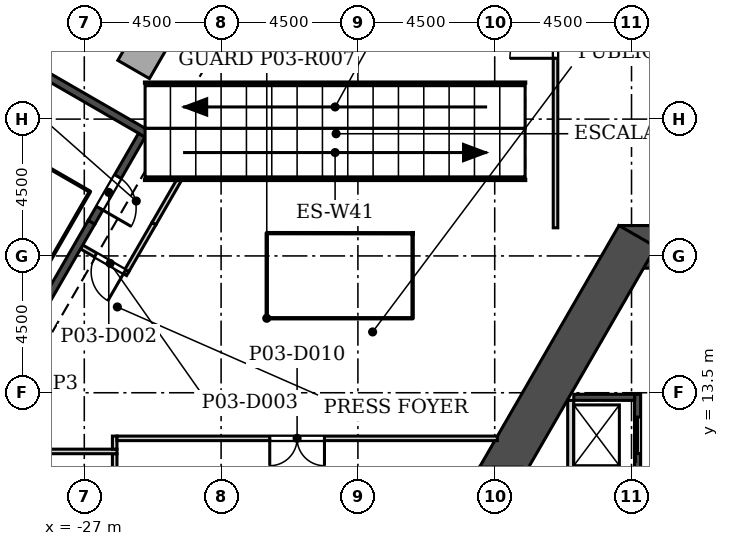
"""IFC4 building model, lengths in metres.
Left out: names, types, materials, properties, quantities, classifications, styles, units other than length and angle.
Written with IfcOpenShell. Run it as: python <this file> out.ifc"""

import sys

from ifc_helpers import new_model, si_unit, direction, frame, frame_2d, origin, place, context, subcontext, project, spatial, polyline, rectangle, outline, extrude, element, fill, save


model = new_model("IFC4")
c1 = context("Model", 3, precision=1e-05, world=origin(), true_north=direction((0.0, 1.0)))
c2 = subcontext(c1, "Body", "Model", "MODEL_VIEW")
j1 = project(units=[si_unit("LENGTHUNIT", "METRE"), si_unit("PLANEANGLEUNIT", "RADIAN")], contexts=[c1])
p1 = place(None, origin())
s1 = spatial("IfcSite", under=j1, at=p1, CompositionType="ELEMENT")
p2 = place(p1, origin())
s2 = spatial("IfcBuilding", under=s1, at=p2, CompositionType="ELEMENT")
p3 = place(p2, frame((0.0, 0.0, 20.0)))
s3 = spatial("IfcBuildingStorey", under=s2, at=p3, CompositionType="ELEMENT", Elevation=20.0)
p4 = place(p3, frame((9.412, 18.3, 0.0), z_axis=(0.0, 0.0, 1.0), x_axis=(-1.0, 0.0, 0.0)))
e1 = element("IfcWall", 1, at=p4, inside=s3, PredefinedType="SHEAR", context=c2, shape_type="SweptSolid", body=[
    extrude(rectangle(XDim=18.823, YDim=1.4, at=frame_2d((9.412, 0.0))), origin(), (0.0, 0.0, 1.0), 5.0),
])
p5 = place(p4, frame((8.711, 0.0, 0.0)))
e2 = element("IfcOpeningElement", 2, at=p5, cuts=e1, PredefinedType="OPENING", context=c2, shape_type="SweptSolid", body=[
    extrude(rectangle(XDim=1.4, YDim=2.1, at=frame_2d((0.7, 1.05))), frame((0.0, 0.71, 0.0), z_axis=(0.0, -1.0, 0.0), x_axis=(1.0, 0.0, 0.0)), (0.0, 0.0, 1.0), 1.42),
])
p6 = place(p4, frame((11.412, 0.0, 0.0)))
e3 = element("IfcOpeningElement", 3, at=p6, cuts=e1, PredefinedType="OPENING", context=c2, shape_type="SweptSolid", body=[
    extrude(rectangle(XDim=6.0, YDim=2.4, at=frame_2d((3.0, 1.2))), frame((0.0, 0.71, 0.0), z_axis=(0.0, -1.0, 0.0), x_axis=(1.0, 0.0, 0.0)), (0.0, 0.0, 1.0), 1.42),
])
p7 = place(p4, frame((1.412, 0.0, 0.0)))
e4 = element("IfcOpeningElement", 4, at=p7, cuts=e1, PredefinedType="OPENING", context=c2, shape_type="SweptSolid", body=[
    extrude(rectangle(XDim=6.0, YDim=2.4, at=frame_2d((3.0, 1.2))), frame((0.0, 0.71, 0.0), z_axis=(0.0, -1.0, 0.0), x_axis=(1.0, 0.0, 0.0)), (0.0, 0.0, 1.0), 1.42),
])
p8 = place(p3, frame((-8.805, 18.65, 0.0), z_axis=(0.0, 0.0, 1.0), x_axis=(-0.50000187635, -0.866024320471, 0.0)))
e5 = element("IfcWall", 5, at=p8, inside=s3, PredefinedType="SHEAR", context=c2, shape_type="SweptSolid", body=[
    extrude(rectangle(XDim=9.177, YDim=1.4, at=frame_2d((4.588, 0.0))), origin(), (0.0, 0.0, 1.0), 5.0),
])
p9 = place(p3, frame((-4.853, 74.393, 0.0), z_axis=(0.0, 0.0, 1.0), x_axis=(-0.49999894854, -0.866026010844, 0.0)))
e6 = element("IfcWall", 6, at=p9, inside=s3, PredefinedType="SOLIDWALL", context=c2, shape_type="SweptSolid", body=[
    extrude(rectangle(XDim=76.0, YDim=0.34, at=frame_2d((38.0, 0.0))), origin(), (0.0, 0.0, 1.0), 3.0),
])
p10 = place(p9, frame((1.058, 0.0, 0.9)))
e7 = element("IfcOpeningElement", 7, at=p10, cuts=e6, PredefinedType="OPENING", context=c2, shape_type="SweptSolid", body=[
    extrude(rectangle(XDim=1.885, YDim=1.9, at=frame_2d((0.942, 0.95))), frame((0.0, 0.18, 0.0), z_axis=(0.0, -1.0, 0.0), x_axis=(1.0, 0.0, 0.0)), (0.0, 0.0, 1.0), 0.36),
])
p11 = place(p9, frame((4.058, 0.0, 0.9)))
e8 = element("IfcOpeningElement", 8, at=p11, cuts=e6, PredefinedType="OPENING", context=c2, shape_type="SweptSolid", body=[
    extrude(rectangle(XDim=1.885, YDim=1.9, at=frame_2d((0.942, 0.95))), frame((0.0, 0.18, 0.0), z_axis=(0.0, -1.0, 0.0), x_axis=(1.0, 0.0, 0.0)), (0.0, 0.0, 1.0), 0.36),
])
p12 = place(p9, frame((7.058, 0.0, 0.9)))
e9 = element("IfcOpeningElement", 9, at=p12, cuts=e6, PredefinedType="OPENING", context=c2, shape_type="SweptSolid", body=[
    extrude(rectangle(XDim=1.885, YDim=1.9, at=frame_2d((0.942, 0.95))), frame((0.0, 0.18, 0.0), z_axis=(0.0, -1.0, 0.0), x_axis=(1.0, 0.0, 0.0)), (0.0, 0.0, 1.0), 0.36),
])
p13 = place(p9, frame((10.058, 0.0, 0.9)))
e10 = element("IfcOpeningElement", 10, at=p13, cuts=e6, PredefinedType="OPENING", context=c2, shape_type="SweptSolid", body=[
    extrude(rectangle(XDim=1.885, YDim=1.9, at=frame_2d((0.942, 0.95))), frame((0.0, 0.18, 0.0), z_axis=(0.0, -1.0, 0.0), x_axis=(1.0, 0.0, 0.0)), (0.0, 0.0, 1.0), 0.36),
])
p14 = place(p9, frame((13.058, 0.0, 0.9)))
e11 = element("IfcOpeningElement", 11, at=p14, cuts=e6, PredefinedType="OPENING", context=c2, shape_type="SweptSolid", body=[
    extrude(rectangle(XDim=1.885, YDim=1.9, at=frame_2d((0.942, 0.95))), frame((0.0, 0.18, 0.0), z_axis=(0.0, -1.0, 0.0), x_axis=(1.0, 0.0, 0.0)), (0.0, 0.0, 1.0), 0.36),
])
p15 = place(p9, frame((16.058, 0.0, 0.9)))
e12 = element("IfcOpeningElement", 12, at=p15, cuts=e6, PredefinedType="OPENING", context=c2, shape_type="SweptSolid", body=[
    extrude(rectangle(XDim=1.885, YDim=1.9, at=frame_2d((0.942, 0.95))), frame((0.0, 0.18, 0.0), z_axis=(0.0, -1.0, 0.0), x_axis=(1.0, 0.0, 0.0)), (0.0, 0.0, 1.0), 0.36),
])
p16 = place(p9, frame((19.058, 0.0, 0.9)))
e13 = element("IfcOpeningElement", 13, at=p16, cuts=e6, PredefinedType="OPENING", context=c2, shape_type="SweptSolid", body=[
    extrude(rectangle(XDim=1.885, YDim=1.9, at=frame_2d((0.942, 0.95))), frame((0.0, 0.18, 0.0), z_axis=(0.0, -1.0, 0.0), x_axis=(1.0, 0.0, 0.0)), (0.0, 0.0, 1.0), 0.36),
])
p17 = place(p9, frame((22.058, 0.0, 0.9)))
e14 = element("IfcOpeningElement", 14, at=p17, cuts=e6, PredefinedType="OPENING", context=c2, shape_type="SweptSolid", body=[
    extrude(rectangle(XDim=1.885, YDim=1.9, at=frame_2d((0.942, 0.95))), frame((0.0, 0.18, 0.0), z_axis=(0.0, -1.0, 0.0), x_axis=(1.0, 0.0, 0.0)), (0.0, 0.0, 1.0), 0.36),
])
p18 = place(p9, frame((25.058, 0.0, 0.9)))
e15 = element("IfcOpeningElement", 15, at=p18, cuts=e6, PredefinedType="OPENING", context=c2, shape_type="SweptSolid", body=[
    extrude(rectangle(XDim=1.885, YDim=1.9, at=frame_2d((0.942, 0.95))), frame((0.0, 0.18, 0.0), z_axis=(0.0, -1.0, 0.0), x_axis=(1.0, 0.0, 0.0)), (0.0, 0.0, 1.0), 0.36),
])
p19 = place(p9, frame((28.058, 0.0, 0.9)))
e16 = element("IfcOpeningElement", 16, at=p19, cuts=e6, PredefinedType="OPENING", context=c2, shape_type="SweptSolid", body=[
    extrude(rectangle(XDim=1.885, YDim=1.9, at=frame_2d((0.942, 0.95))), frame((0.0, 0.18, 0.0), z_axis=(0.0, -1.0, 0.0), x_axis=(1.0, 0.0, 0.0)), (0.0, 0.0, 1.0), 0.36),
])
p20 = place(p9, frame((31.058, 0.0, 0.9)))
e17 = element("IfcOpeningElement", 17, at=p20, cuts=e6, PredefinedType="OPENING", context=c2, shape_type="SweptSolid", body=[
    extrude(rectangle(XDim=1.885, YDim=1.9, at=frame_2d((0.942, 0.95))), frame((0.0, 0.18, 0.0), z_axis=(0.0, -1.0, 0.0), x_axis=(1.0, 0.0, 0.0)), (0.0, 0.0, 1.0), 0.36),
])
p21 = place(p9, frame((34.058, 0.0, 0.9)))
e18 = element("IfcOpeningElement", 18, at=p21, cuts=e6, PredefinedType="OPENING", context=c2, shape_type="SweptSolid", body=[
    extrude(rectangle(XDim=1.885, YDim=1.9, at=frame_2d((0.942, 0.95))), frame((0.0, 0.18, 0.0), z_axis=(0.0, -1.0, 0.0), x_axis=(1.0, 0.0, 0.0)), (0.0, 0.0, 1.0), 0.36),
])
p22 = place(p9, frame((37.058, 0.0, 0.9)))
e19 = element("IfcOpeningElement", 19, at=p22, cuts=e6, PredefinedType="OPENING", context=c2, shape_type="SweptSolid", body=[
    extrude(rectangle(XDim=1.885, YDim=1.9, at=frame_2d((0.942, 0.95))), frame((0.0, 0.18, 0.0), z_axis=(0.0, -1.0, 0.0), x_axis=(1.0, 0.0, 0.0)), (0.0, 0.0, 1.0), 0.36),
])
p23 = place(p9, frame((40.058, 0.0, 0.9)))
e20 = element("IfcOpeningElement", 20, at=p23, cuts=e6, PredefinedType="OPENING", context=c2, shape_type="SweptSolid", body=[
    extrude(rectangle(XDim=1.885, YDim=1.9, at=frame_2d((0.942, 0.95))), frame((0.0, 0.18, 0.0), z_axis=(0.0, -1.0, 0.0), x_axis=(1.0, 0.0, 0.0)), (0.0, 0.0, 1.0), 0.36),
])
p24 = place(p9, frame((43.058, 0.0, 0.9)))
e21 = element("IfcOpeningElement", 21, at=p24, cuts=e6, PredefinedType="OPENING", context=c2, shape_type="SweptSolid", body=[
    extrude(rectangle(XDim=1.885, YDim=1.9, at=frame_2d((0.942, 0.95))), frame((0.0, 0.18, 0.0), z_axis=(0.0, -1.0, 0.0), x_axis=(1.0, 0.0, 0.0)), (0.0, 0.0, 1.0), 0.36),
])
p25 = place(p9, frame((46.058, 0.0, 0.9)))
e22 = element("IfcOpeningElement", 22, at=p25, cuts=e6, PredefinedType="OPENING", context=c2, shape_type="SweptSolid", body=[
    extrude(rectangle(XDim=1.885, YDim=1.9, at=frame_2d((0.942, 0.95))), frame((0.0, 0.18, 0.0), z_axis=(0.0, -1.0, 0.0), x_axis=(1.0, 0.0, 0.0)), (0.0, 0.0, 1.0), 0.36),
])
p26 = place(p9, frame((49.058, 0.0, 0.9)))
e23 = element("IfcOpeningElement", 23, at=p26, cuts=e6, PredefinedType="OPENING", context=c2, shape_type="SweptSolid", body=[
    extrude(rectangle(XDim=1.885, YDim=1.9, at=frame_2d((0.942, 0.95))), frame((0.0, 0.18, 0.0), z_axis=(0.0, -1.0, 0.0), x_axis=(1.0, 0.0, 0.0)), (0.0, 0.0, 1.0), 0.36),
])
p27 = place(p9, frame((52.058, 0.0, 0.9)))
e24 = element("IfcOpeningElement", 24, at=p27, cuts=e6, PredefinedType="OPENING", context=c2, shape_type="SweptSolid", body=[
    extrude(rectangle(XDim=1.885, YDim=1.9, at=frame_2d((0.942, 0.95))), frame((0.0, 0.18, 0.0), z_axis=(0.0, -1.0, 0.0), x_axis=(1.0, 0.0, 0.0)), (0.0, 0.0, 1.0), 0.36),
])
p28 = place(p9, frame((55.058, 0.0, 0.9)))
e25 = element("IfcOpeningElement", 25, at=p28, cuts=e6, PredefinedType="OPENING", context=c2, shape_type="SweptSolid", body=[
    extrude(rectangle(XDim=1.885, YDim=1.9, at=frame_2d((0.942, 0.95))), frame((0.0, 0.18, 0.0), z_axis=(0.0, -1.0, 0.0), x_axis=(1.0, 0.0, 0.0)), (0.0, 0.0, 1.0), 0.36),
])
p29 = place(p9, frame((58.058, 0.0, 0.9)))
e26 = element("IfcOpeningElement", 26, at=p29, cuts=e6, PredefinedType="OPENING", context=c2, shape_type="SweptSolid", body=[
    extrude(rectangle(XDim=1.885, YDim=1.9, at=frame_2d((0.942, 0.95))), frame((0.0, 0.18, 0.0), z_axis=(0.0, -1.0, 0.0), x_axis=(1.0, 0.0, 0.0)), (0.0, 0.0, 1.0), 0.36),
])
p30 = place(p9, frame((61.058, 0.0, 0.9)))
e27 = element("IfcOpeningElement", 27, at=p30, cuts=e6, PredefinedType="OPENING", context=c2, shape_type="SweptSolid", body=[
    extrude(rectangle(XDim=1.885, YDim=1.9, at=frame_2d((0.942, 0.95))), frame((0.0, 0.18, 0.0), z_axis=(0.0, -1.0, 0.0), x_axis=(1.0, 0.0, 0.0)), (0.0, 0.0, 1.0), 0.36),
])
p31 = place(p9, frame((64.058, 0.0, 0.9)))
e28 = element("IfcOpeningElement", 28, at=p31, cuts=e6, PredefinedType="OPENING", context=c2, shape_type="SweptSolid", body=[
    extrude(rectangle(XDim=1.885, YDim=1.9, at=frame_2d((0.942, 0.95))), frame((0.0, 0.18, 0.0), z_axis=(0.0, -1.0, 0.0), x_axis=(1.0, 0.0, 0.0)), (0.0, 0.0, 1.0), 0.36),
])
p32 = place(p9, frame((67.058, 0.0, 0.9)))
e29 = element("IfcOpeningElement", 29, at=p32, cuts=e6, PredefinedType="OPENING", context=c2, shape_type="SweptSolid", body=[
    extrude(rectangle(XDim=1.885, YDim=1.9, at=frame_2d((0.942, 0.95))), frame((0.0, 0.18, 0.0), z_axis=(0.0, -1.0, 0.0), x_axis=(1.0, 0.0, 0.0)), (0.0, 0.0, 1.0), 0.36),
])
p33 = place(p9, frame((70.058, 0.0, 0.9)))
e30 = element("IfcOpeningElement", 30, at=p33, cuts=e6, PredefinedType="OPENING", context=c2, shape_type="SweptSolid", body=[
    extrude(rectangle(XDim=1.885, YDim=1.9, at=frame_2d((0.942, 0.95))), frame((0.0, 0.18, 0.0), z_axis=(0.0, -1.0, 0.0), x_axis=(1.0, 0.0, 0.0)), (0.0, 0.0, 1.0), 0.36),
])
p34 = place(p9, frame((73.058, 0.0, 0.9)))
e31 = element("IfcOpeningElement", 31, at=p34, cuts=e6, PredefinedType="OPENING", context=c2, shape_type="SweptSolid", body=[
    extrude(rectangle(XDim=1.885, YDim=1.9, at=frame_2d((0.942, 0.95))), frame((0.0, 0.18, 0.0), z_axis=(0.0, -1.0, 0.0), x_axis=(1.0, 0.0, 0.0)), (0.0, 0.0, 1.0), 0.36),
])
p35 = place(p3, frame((0.0, 0.0, 5.0)))
e32 = element("IfcWall", 32, at=p35, inside=s3, PredefinedType="USERDEFINED", context=c2, shape_type="SweptSolid", body=[
    extrude(outline(polyline([(-21.857, 29.029), (-22.896, 29.629), (-25.896, 24.433), (-24.857, 23.833), (-21.857, 29.029)])), origin(), (0.0, 0.0, 1.0), 1.1),
])
p36 = place(p3, frame((-11.0, 5.85, 0.0), z_axis=(0.0, 0.0, 1.0), x_axis=(0.0, 1.0, 0.0)))
e33 = element("IfcWall", 33, at=p36, inside=s3, PredefinedType="SOLIDWALL", context=c2, shape_type="SweptSolid", body=[
    extrude(rectangle(XDim=7.4, YDim=0.2, at=frame_2d((3.7, 0.0))), origin(), (0.0, 0.0, 1.0), 3.0),
])
p37 = place(p3, frame((-8.8, 8.25, -0.3), z_axis=(0.0, 0.0, 1.0), x_axis=(0.0, 1.0, 0.0)))
e34 = element("IfcWall", 34, at=p37, inside=s3, PredefinedType="SOLIDWALL", context=c2, shape_type="SweptSolid", body=[
    extrude(rectangle(XDim=5.2, YDim=0.2, at=frame_2d((2.6, 0.0))), origin(), (0.0, 0.0, 1.0), 3.3),
])
p38 = place(p37, frame((0.75, 0.0, 0.3)))
e35 = element("IfcOpeningElement", 35, at=p38, cuts=e34, PredefinedType="OPENING", context=c2, shape_type="SweptSolid", body=[
    extrude(rectangle(XDim=1.2, YDim=2.1, at=frame_2d((0.6, 1.05))), frame((0.0, 0.11, 0.0), z_axis=(0.0, -1.0, 0.0), x_axis=(1.0, 0.0, 0.0)), (0.0, 0.0, 1.0), 0.22),
])
p39 = place(p37, frame((3.25, 0.0, 0.3)))
e36 = element("IfcOpeningElement", 36, at=p39, cuts=e34, PredefinedType="OPENING", context=c2, shape_type="SweptSolid", body=[
    extrude(rectangle(XDim=1.2, YDim=2.1, at=frame_2d((0.6, 1.05))), frame((0.0, 0.11, 0.0), z_axis=(0.0, -1.0, 0.0), x_axis=(1.0, 0.0, 0.0)), (0.0, 0.0, 1.0), 0.22),
])
p40 = place(p3, frame((-10.9, 13.35, -0.3), z_axis=(0.0, 0.0, 1.0), x_axis=(1.0, 0.0, 0.0)))
e37 = element("IfcWall", 37, at=p40, inside=s3, PredefinedType="SOLIDWALL", context=c2, shape_type="SweptSolid", body=[
    extrude(rectangle(XDim=2.0, YDim=0.2, at=frame_2d((1.0, 0.0))), origin(), (0.0, 0.0, 1.0), 3.3),
])
p41 = place(p3, frame((-26.0, 11.495, 0.0), z_axis=(0.0, 0.0, 1.0), x_axis=(0.0, -1.0, 0.0)))
e38 = element("IfcWall", 38, at=p41, inside=s3, PredefinedType="PARTITIONING", context=c2, shape_type="SweptSolid", body=[
    extrude(rectangle(XDim=1.42, YDim=0.15, at=frame_2d((0.71, 0.0))), origin(), (0.0, 0.0, 1.0), 3.0),
])
p42 = place(p3, frame((-40.968, 11.57, 0.0), z_axis=(0.0, 0.0, 1.0), x_axis=(1.0, 0.0, 0.0)))
e39 = element("IfcWall", 39, at=p42, inside=s3, PredefinedType="PARTITIONING", context=c2, shape_type="SweptSolid", body=[
    extrude(rectangle(XDim=15.043, YDim=0.15, at=frame_2d((7.521, 0.0))), origin(), (0.0, 0.0, 1.0), 3.0),
])
p43 = place(p42, frame((2.068, 0.0, 0.0)))
e40 = element("IfcOpeningElement", 40, at=p43, cuts=e39, PredefinedType="OPENING", context=c2, shape_type="SweptSolid", body=[
    extrude(rectangle(XDim=1.8, YDim=2.1, at=frame_2d((0.9, 1.05))), frame((0.0, 0.085, 0.0), z_axis=(0.0, -1.0, 0.0), x_axis=(1.0, 0.0, 0.0)), (0.0, 0.0, 1.0), 0.17),
])
p44 = place(p3, frame((-26.0, 11.645, 0.0), z_axis=(0.0, 0.0, 1.0), x_axis=(0.0, 1.0, 0.0)))
e41 = element("IfcWall", 41, at=p44, inside=s3, PredefinedType="PARTITIONING", context=c2, shape_type="SweptSolid", body=[
    extrude(rectangle(XDim=0.43, YDim=0.15, at=frame_2d((0.215, 0.0))), origin(), (0.0, 0.0, 1.0), 3.0),
])
p45 = place(p3, frame((-25.925, 12.0, 0.0), z_axis=(0.0, 0.0, 1.0), x_axis=(1.0, 0.0, 0.0)))
e42 = element("IfcWall", 42, at=p45, inside=s3, PredefinedType="PARTITIONING", context=c2, shape_type="SweptSolid", body=[
    extrude(rectangle(XDim=12.512, YDim=0.15, at=frame_2d((6.256, 0.0))), origin(), (0.0, 0.0, 1.0), 3.0),
])
p46 = place(p45, frame((5.025, 0.0, 0.0)))
e43 = element("IfcOpeningElement", 43, at=p46, cuts=e42, PredefinedType="OPENING", context=c2, shape_type="SweptSolid", body=[
    extrude(rectangle(XDim=1.8, YDim=2.1, at=frame_2d((0.9, 1.05))), frame((0.0, 0.085, 0.0), z_axis=(0.0, -1.0, 0.0), x_axis=(1.0, 0.0, 0.0)), (0.0, 0.0, 1.0), 0.17),
])
p47 = place(p3, frame((-25.571, 17.419, 0.0), z_axis=(0.0, 0.0, 1.0), x_axis=(-0.866046247233, 0.49996389635, 0.0)))
e44 = element("IfcWall", 44, at=p47, inside=s3, PredefinedType="PARTITIONING", context=c2, shape_type="SweptSolid", body=[
    extrude(rectangle(XDim=1.751, YDim=0.15, at=frame_2d((0.875, 0.0))), origin(), (0.0, 0.0, 1.0), 3.0),
])
p48 = place(p47, frame((0.12, 0.0, 0.0)))
e45 = element("IfcOpeningElement", 45, at=p48, cuts=e44, PredefinedType="OPENING", context=c2, shape_type="SweptSolid", body=[
    extrude(rectangle(XDim=1.1, YDim=2.1, at=frame_2d((0.55, 1.05))), frame((0.0, 0.085, 0.0), z_axis=(0.0, -1.0, 0.0), x_axis=(1.0, 0.0, 0.0)), (0.0, 0.0, 1.0), 0.17),
])
p49 = place(p3, frame((-24.707, 19.065, 0.0), z_axis=(0.0, 0.0, 1.0), x_axis=(-0.500058459303, -0.865991649659, 0.0)))
e46 = element("IfcWall", 46, at=p49, inside=s3, PredefinedType="PARTITIONING", context=c2, shape_type="SweptSolid", body=[
    extrude(rectangle(XDim=1.782, YDim=0.15, at=frame_2d((0.891, 0.0))), origin(), (0.0, 0.0, 1.0), 3.0),
])
p50 = place(p3, frame((-26.761, 19.108, 0.0), z_axis=(0.0, 0.0, 1.0), x_axis=(-0.499979843709, -0.866037040711, 0.0)))
e47 = element("IfcWall", 47, at=p50, inside=s3, PredefinedType="SOLIDWALL", context=c2, shape_type="SweptSolid", body=[
    extrude(rectangle(XDim=8.293, YDim=0.25, at=frame_2d((4.146, 0.0))), origin(), (0.0, 0.0, 1.0), 3.0),
])
p51 = place(p3, frame((-23.841, 20.565, 0.0), z_axis=(0.0, 0.0, 1.0), x_axis=(-0.500019299785, -0.866014260761, 0.0)))
e48 = element("IfcWall", 48, at=p51, inside=s3, PredefinedType="PARTITIONING", context=c2, shape_type="SweptSolid", body=[
    extrude(rectangle(XDim=1.732, YDim=0.15, at=frame_2d((0.866, 0.0))), origin(), (0.0, 0.0, 1.0), 3.0),
])
p52 = place(p3, frame((-25.107, 21.972, 0.0), z_axis=(0.0, 0.0, 1.0), x_axis=(-0.500005757777, -0.866022079505, 0.0)))
e49 = element("IfcWall", 49, at=p52, inside=s3, PredefinedType="SOLIDWALL", context=c2, shape_type="SweptSolid", body=[
    extrude(rectangle(XDim=3.307, YDim=0.25, at=frame_2d((1.654, 0.0))), origin(), (0.0, 0.0, 1.0), 3.0),
])
p53 = place(p52, frame((1.575, 0.0, 0.0)))
e50 = element("IfcOpeningElement", 50, at=p53, cuts=e49, PredefinedType="OPENING", context=c2, shape_type="SweptSolid", body=[
    extrude(rectangle(XDim=1.2, YDim=2.1, at=frame_2d((0.6, 1.05))), frame((0.0, 0.135, 0.0), z_axis=(0.0, -1.0, 0.0), x_axis=(1.0, 0.0, 0.0)), (0.0, 0.0, 1.0), 0.27),
])
p54 = place(p3, frame((-30.652, 25.318, 0.0), z_axis=(0.0, 0.0, 1.0), x_axis=(0.866040211805, -0.499974350878, 0.0)))
e51 = element("IfcWall", 51, at=p54, inside=s3, PredefinedType="SOLIDWALL", context=c2, shape_type="SweptSolid", body=[
    extrude(rectangle(XDim=6.6, YDim=0.25, at=frame_2d((3.3, 0.0))), origin(), (0.0, 0.0, 1.0), 3.0),
])
p55 = place(p3, frame((-11.5, 28.835, 0.0), z_axis=(0.0, 0.0, 1.0), x_axis=(0.0, -1.0, 0.0)))
e52 = element("IfcWall", 52, at=p55, inside=s3, PredefinedType="PARTITIONING", context=c2, shape_type="SweptSolid", body=[
    extrude(rectangle(XDim=9.91, YDim=0.15, at=frame_2d((4.955, 0.0))), origin(), (0.0, 0.0, 1.0), 3.0),
])
p56 = place(p55, frame((1.335, 0.0, 0.0)))
e53 = element("IfcOpeningElement", 53, at=p56, cuts=e52, PredefinedType="OPENING", context=c2, shape_type="SweptSolid", body=[
    extrude(rectangle(XDim=3.0, YDim=2.4, at=frame_2d((1.5, 1.2))), frame((0.0, 0.085, 0.0), z_axis=(0.0, -1.0, 0.0), x_axis=(1.0, 0.0, 0.0)), (0.0, 0.0, 1.0), 0.17),
])
p57 = place(p39, origin())
e54 = element("IfcDoor", 54, at=p57, inside=s3, OperationType="SLIDING_TO_LEFT", PredefinedType="DOOR", context=c2, shape_type="SweptSolid", body=[
    extrude(rectangle(XDim=1.2, YDim=2.1, at=frame_2d((0.6, 1.05))), frame((0.0, 0.025, 0.0), z_axis=(0.0, -1.0, 0.0), x_axis=(1.0, 0.0, 0.0)), (0.0, 0.0, 1.0), 0.05),
])
fill(e36, e54)
p58 = place(p53, origin())
e55 = element("IfcDoor", 55, at=p58, inside=s3, OperationType="SINGLE_SWING_RIGHT", PredefinedType="DOOR", context=c2, shape_type="SweptSolid", body=[
    extrude(rectangle(XDim=1.2, YDim=2.1, at=frame_2d((0.6, 1.05))), frame((0.0, 0.025, 0.0), z_axis=(0.0, -1.0, 0.0), x_axis=(1.0, 0.0, 0.0)), (0.0, 0.0, 1.0), 0.05),
])
fill(e50, e55)
p59 = place(p48, origin())
e56 = element("IfcDoor", 56, at=p59, inside=s3, OperationType="SINGLE_SWING_LEFT", PredefinedType="DOOR", context=c2, shape_type="SweptSolid", body=[
    extrude(rectangle(XDim=1.1, YDim=2.1, at=frame_2d((0.55, 1.05))), frame((0.0, 0.025, 0.0), z_axis=(0.0, -1.0, 0.0), x_axis=(1.0, 0.0, 0.0)), (0.0, 0.0, 1.0), 0.05),
])
fill(e45, e56)
p60 = place(p46, frame((1.8, 0.0, 0.0), z_axis=(0.0, 0.0, 1.0), x_axis=(-1.0, 0.0, 0.0)))
e57 = element("IfcDoor", 57, at=p60, inside=s3, OperationType="DOUBLE_DOOR_SINGLE_SWING", PredefinedType="DOOR", context=c2, shape_type="SweptSolid", body=[
    extrude(rectangle(XDim=1.8, YDim=2.1, at=frame_2d((0.9, 1.05))), frame((0.0, 0.025, 0.0), z_axis=(0.0, -1.0, 0.0), x_axis=(1.0, 0.0, 0.0)), (0.0, 0.0, 1.0), 0.05),
])
fill(e43, e57)
p61 = place(p56, frame((3.0, 0.0, 0.0), z_axis=(0.0, 0.0, 1.0), x_axis=(-1.0, 0.0, 0.0)))
e58 = element("IfcDoor", 58, at=p61, inside=s3, OperationType="DOUBLE_DOOR_SINGLE_SWING", PredefinedType="DOOR", context=c2, shape_type="SweptSolid", body=[
    extrude(rectangle(XDim=3.0, YDim=2.4, at=frame_2d((1.5, 1.2))), frame((0.0, 0.025, 0.0), z_axis=(0.0, -1.0, 0.0), x_axis=(1.0, 0.0, 0.0)), (0.0, 0.0, 1.0), 0.05),
])
fill(e53, e58)
save(model, sys.argv[1])
